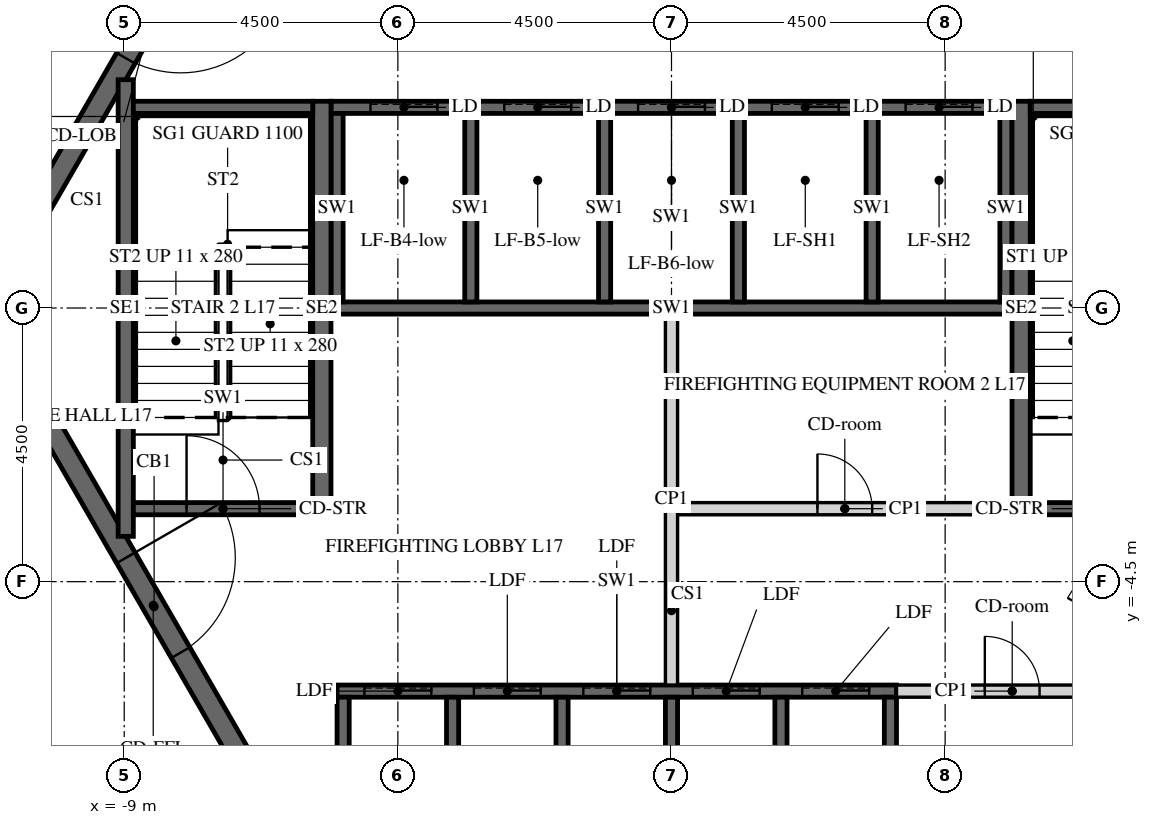
"""IFC4 building model, lengths in metres.
Left out: names, types, materials, properties, quantities, classifications, styles, units other than length and angle.
Written with IfcOpenShell. Run it as: python <this file> out.ifc"""

import sys

from ifc_helpers import new_model, si_unit, direction, frame, frame_2d, origin, place, context, subcontext, project, spatial, polyline, rectangle, outline, extrude, element, fill, save


model = new_model("IFC4")
c1 = context("Model", 3, precision=1e-05, world=origin(), true_north=direction((0.0, 1.0)))
c2 = subcontext(c1, "Body", "Model", "MODEL_VIEW")
j1 = project(units=[si_unit("LENGTHUNIT", "METRE"), si_unit("PLANEANGLEUNIT", "RADIAN")], contexts=[c1])
p1 = place(None, origin())
s1 = spatial("IfcSite", under=j1, at=p1, CompositionType="ELEMENT")
p2 = place(p1, origin())
s2 = spatial("IfcBuilding", under=s1, at=p2, CompositionType="ELEMENT")
p3 = place(p2, frame((0.0, 0.0, 80.4)))
s3 = spatial("IfcBuildingStorey", under=s2, at=p3, CompositionType="ELEMENT", Elevation=80.4)
p4 = place(p3, frame((-7.91, 13.7, -0.15), z_axis=(0.0, 0.0, 1.0), x_axis=(-0.499999880136, -0.866025472988, 0.0)))
e1 = element("IfcWall", 1, at=p4, inside=s3, PredefinedType="SHEAR", context=c2, shape_type="SweptSolid", body=[
    extrude(outline(polyline([(-0.173, -0.3), (15.993, -0.3), (15.646, 0.3), (0.173, 0.3), (-0.173, -0.3)])), origin(), (0.0, 0.0, 1.0), 3.9),
])
p5 = place(p4, frame((7.039, 0.0, 0.15)))
e2 = element("IfcOpeningElement", 2, at=p5, cuts=e1, PredefinedType="OPENING", context=c2, shape_type="SweptSolid", body=[
    extrude(rectangle(XDim=1.8, YDim=2.4, at=frame_2d((0.9, 1.2))), frame((0.0, 0.31, 0.0), z_axis=(0.0, -1.0, 0.0), x_axis=(1.0, 0.0, 0.0)), (0.0, 0.0, 1.0), 0.62),
])
p6 = place(p3, frame((-15.819, 0.0, -0.15), z_axis=(0.0, 0.0, 1.0), x_axis=(0.499999880136, -0.866025472988, 0.0)))
e3 = element("IfcWall", 3, at=p6, inside=s3, PredefinedType="SHEAR", context=c2, shape_type="SweptSolid", body=[
    extrude(outline(polyline([(-0.173, -0.3), (15.993, -0.3), (15.646, 0.3), (0.173, 0.3), (-0.173, -0.3)])), origin(), (0.0, 0.0, 1.0), 3.9),
])
p7 = place(p6, frame((6.981, 0.0, 0.15)))
e4 = element("IfcOpeningElement", 4, at=p7, cuts=e3, PredefinedType="OPENING", context=c2, shape_type="SweptSolid", body=[
    extrude(rectangle(XDim=1.8, YDim=2.4, at=frame_2d((0.9, 1.2))), frame((0.0, 0.31, 0.0), z_axis=(0.0, -1.0, 0.0), x_axis=(1.0, 0.0, 0.0)), (0.0, 0.0, 1.0), 0.62),
])
p8 = place(p3, frame((-5.673, 9.825, -0.15), z_axis=(0.0, 0.0, 1.0), x_axis=(-0.499995046907, -0.866028263435, 0.0)))
e5 = element("IfcWall", 5, at=p8, inside=s3, PredefinedType="SHEAR", context=c2, shape_type="SweptSolid", body=[
    extrude(outline(polyline([(-0.101, -0.175), (11.446, -0.175), (11.244, 0.175), (0.101, 0.175), (-0.101, -0.175)])), origin(), (0.0, 0.0, 1.0), 3.9),
])
p9 = place(p8, frame((4.801, 0.0, 0.15)))
e6 = element("IfcOpeningElement", 6, at=p9, cuts=e5, PredefinedType="OPENING", context=c2, shape_type="SweptSolid", body=[
    extrude(rectangle(XDim=1.8, YDim=2.4, at=frame_2d((0.9, 1.2))), frame((0.0, 0.185, 0.0), z_axis=(0.0, -1.0, 0.0), x_axis=(1.0, 0.0, 0.0)), (0.0, 0.0, 1.0), 0.37),
])
p10 = place(p3, frame((-11.345, 0.0, -0.15), z_axis=(0.0, 0.0, 1.0), x_axis=(0.499995046907, -0.866028263435, 0.0)))
e7 = element("IfcWall", 7, at=p10, inside=s3, PredefinedType="SHEAR", context=c2, shape_type="SweptSolid", body=[
    extrude(outline(polyline([(-0.101, -0.175), (11.446, -0.175), (11.244, 0.175), (0.101, 0.175), (-0.101, -0.175)])), origin(), (0.0, 0.0, 1.0), 3.9),
])
p11 = place(p10, frame((4.744, 0.0, 0.15)))
e8 = element("IfcOpeningElement", 8, at=p11, cuts=e7, PredefinedType="OPENING", context=c2, shape_type="SweptSolid", body=[
    extrude(rectangle(XDim=1.8, YDim=2.4, at=frame_2d((0.9, 1.2))), frame((0.0, 0.185, 0.0), z_axis=(0.0, -1.0, 0.0), x_axis=(1.0, 0.0, 0.0)), (0.0, 0.0, 1.0), 0.37),
])
p12 = place(p3, frame((5.673, -9.825, -0.15), z_axis=(0.0, 0.0, 1.0), x_axis=(0.499995046907, 0.866028263435, 0.0)))
e9 = element("IfcWall", 9, at=p12, inside=s3, PredefinedType="SHEAR", context=c2, shape_type="SweptSolid", body=[
    extrude(outline(polyline([(-0.101, -0.175), (11.446, -0.175), (11.244, 0.175), (0.101, 0.175), (-0.101, -0.175)])), origin(), (0.0, 0.0, 1.0), 3.9),
])
p13 = place(p12, frame((4.801, 0.0, 0.15)))
e10 = element("IfcOpeningElement", 10, at=p13, cuts=e9, PredefinedType="OPENING", context=c2, shape_type="SweptSolid", body=[
    extrude(rectangle(XDim=1.8, YDim=2.4, at=frame_2d((0.9, 1.2))), frame((0.0, 0.185, 0.0), z_axis=(0.0, -1.0, 0.0), x_axis=(1.0, 0.0, 0.0)), (0.0, 0.0, 1.0), 0.37),
])
p14 = place(p3, frame((11.345, 0.0, -0.15), z_axis=(0.0, 0.0, 1.0), x_axis=(-0.499995046907, 0.866028263435, 0.0)))
e11 = element("IfcWall", 11, at=p14, inside=s3, PredefinedType="SHEAR", context=c2, shape_type="SweptSolid", body=[
    extrude(outline(polyline([(-0.101, -0.175), (11.446, -0.175), (11.244, 0.175), (0.101, 0.175), (-0.101, -0.175)])), origin(), (0.0, 0.0, 1.0), 3.9),
])
p15 = place(p14, frame((4.744, 0.0, 0.15)))
e12 = element("IfcOpeningElement", 12, at=p15, cuts=e11, PredefinedType="OPENING", context=c2, shape_type="SweptSolid", body=[
    extrude(rectangle(XDim=1.8, YDim=2.4, at=frame_2d((0.9, 1.2))), frame((0.0, 0.185, 0.0), z_axis=(0.0, -1.0, 0.0), x_axis=(1.0, 0.0, 0.0)), (0.0, 0.0, 1.0), 0.37),
])
p16 = place(p3, frame((-5.6, 3.3, -0.25), z_axis=(0.0, 0.0, 1.0), x_axis=(1.0, 0.0, 0.0)))
e13 = element("IfcWall", 13, at=p16, inside=s3, PredefinedType="SHEAR", context=c2, shape_type="SweptSolid", body=[
    extrude(rectangle(XDim=11.2, YDim=0.2, at=frame_2d((5.6, 0.0))), origin(), (0.0, 0.0, 1.0), 3.9),
])
p17 = place(p16, frame((0.65, 0.0, 0.25)))
e14 = element("IfcOpeningElement", 14, at=p17, cuts=e13, PredefinedType="OPENING", context=c2, shape_type="SweptSolid", body=[
    extrude(rectangle(XDim=1.1, YDim=2.1, at=frame_2d((0.55, 1.05))), frame((0.0, 0.11, 0.0), z_axis=(0.0, -1.0, 0.0), x_axis=(1.0, 0.0, 0.0)), (0.0, 0.0, 1.0), 0.22),
])
p18 = place(p16, frame((2.85, 0.0, 0.25)))
e15 = element("IfcOpeningElement", 15, at=p18, cuts=e13, PredefinedType="OPENING", context=c2, shape_type="SweptSolid", body=[
    extrude(rectangle(XDim=1.1, YDim=2.1, at=frame_2d((0.55, 1.05))), frame((0.0, 0.11, 0.0), z_axis=(0.0, -1.0, 0.0), x_axis=(1.0, 0.0, 0.0)), (0.0, 0.0, 1.0), 0.22),
])
p19 = place(p16, frame((5.05, 0.0, 0.25)))
e16 = element("IfcOpeningElement", 16, at=p19, cuts=e13, PredefinedType="OPENING", context=c2, shape_type="SweptSolid", body=[
    extrude(rectangle(XDim=1.1, YDim=2.1, at=frame_2d((0.55, 1.05))), frame((0.0, 0.11, 0.0), z_axis=(0.0, -1.0, 0.0), x_axis=(1.0, 0.0, 0.0)), (0.0, 0.0, 1.0), 0.22),
])
p20 = place(p16, frame((7.25, 0.0, 0.25)))
e17 = element("IfcOpeningElement", 17, at=p20, cuts=e13, PredefinedType="OPENING", context=c2, shape_type="SweptSolid", body=[
    extrude(rectangle(XDim=1.1, YDim=2.1, at=frame_2d((0.55, 1.05))), frame((0.0, 0.11, 0.0), z_axis=(0.0, -1.0, 0.0), x_axis=(1.0, 0.0, 0.0)), (0.0, 0.0, 1.0), 0.22),
])
p21 = place(p16, frame((9.45, 0.0, 0.25)))
e18 = element("IfcOpeningElement", 18, at=p21, cuts=e13, PredefinedType="OPENING", context=c2, shape_type="SweptSolid", body=[
    extrude(rectangle(XDim=1.1, YDim=2.1, at=frame_2d((0.55, 1.05))), frame((0.0, 0.11, 0.0), z_axis=(0.0, -1.0, 0.0), x_axis=(1.0, 0.0, 0.0)), (0.0, 0.0, 1.0), 0.22),
])
p22 = place(p3, frame((-5.6, 0.0, -0.25), z_axis=(0.0, 0.0, 1.0), x_axis=(1.0, 0.0, 0.0)))
e19 = element("IfcWall", 19, at=p22, inside=s3, PredefinedType="SHEAR", context=c2, shape_type="SweptSolid", body=[
    extrude(rectangle(XDim=11.2, YDim=0.2, at=frame_2d((5.6, 0.0))), origin(), (0.0, 0.0, 1.0), 3.9),
])
for number, where, z_axis, x_axis in (
    (20, (-5.5, 0.1, -0.25), (0.0, 0.0, 1.0), (0.0, 1.0, 0.0)),
    (21, (-3.3, 0.1, -0.25), (0.0, 0.0, 1.0), (0.0, 1.0, 0.0)),
    (22, (-1.1, 0.1, -0.25), (0.0, 0.0, 1.0), (0.0, 1.0, 0.0)),
    (23, (1.1, 0.1, -0.25), (0.0, 0.0, 1.0), (0.0, 1.0, 0.0)),
    (24, (3.3, 0.1, -0.25), (0.0, 0.0, 1.0), (0.0, 1.0, 0.0)),
    (25, (5.5, 0.1, -0.25), (0.0, 0.0, 1.0), (0.0, 1.0, 0.0)),
):
    element("IfcWall", number, at=place(p3, frame(where, z_axis=z_axis, x_axis=x_axis)), inside=s3, PredefinedType="SHEAR", context=c2, shape_type="SweptSolid", body=[
        extrude(rectangle(XDim=3.1, YDim=0.2, at=frame_2d((1.55, 0.0))), origin(), (0.0, 0.0, 1.0), 3.9),
    ])
p23 = place(p3, frame((-5.5, -6.3, -0.25), z_axis=(0.0, 0.0, 1.0), x_axis=(1.0, 0.0, 0.0)))
e26 = element("IfcWall", 26, at=p23, inside=s3, PredefinedType="SHEAR", context=c2, shape_type="SweptSolid", body=[
    extrude(rectangle(XDim=9.2, YDim=0.2, at=frame_2d((4.6, 0.0))), origin(), (0.0, 0.0, 1.0), 3.9),
])
p24 = place(p23, frame((0.45, 0.0, 0.25)))
e27 = element("IfcOpeningElement", 27, at=p24, cuts=e26, PredefinedType="OPENING", context=c2, shape_type="SweptSolid", body=[
    extrude(rectangle(XDim=1.1, YDim=2.1, at=frame_2d((0.55, 1.05))), frame((0.0, 0.11, 0.0), z_axis=(0.0, -1.0, 0.0), x_axis=(1.0, 0.0, 0.0)), (0.0, 0.0, 1.0), 0.22),
])
p25 = place(p23, frame((2.25, 0.0, 0.25)))
e28 = element("IfcOpeningElement", 28, at=p25, cuts=e26, PredefinedType="OPENING", context=c2, shape_type="SweptSolid", body=[
    extrude(rectangle(XDim=1.1, YDim=2.1, at=frame_2d((0.55, 1.05))), frame((0.0, 0.11, 0.0), z_axis=(0.0, -1.0, 0.0), x_axis=(1.0, 0.0, 0.0)), (0.0, 0.0, 1.0), 0.22),
])
p26 = place(p23, frame((4.05, 0.0, 0.25)))
e29 = element("IfcOpeningElement", 29, at=p26, cuts=e26, PredefinedType="OPENING", context=c2, shape_type="SweptSolid", body=[
    extrude(rectangle(XDim=1.1, YDim=2.1, at=frame_2d((0.55, 1.05))), frame((0.0, 0.11, 0.0), z_axis=(0.0, -1.0, 0.0), x_axis=(1.0, 0.0, 0.0)), (0.0, 0.0, 1.0), 0.22),
])
p27 = place(p23, frame((5.85, 0.0, 0.25)))
e30 = element("IfcOpeningElement", 30, at=p27, cuts=e26, PredefinedType="OPENING", context=c2, shape_type="SweptSolid", body=[
    extrude(rectangle(XDim=1.1, YDim=2.1, at=frame_2d((0.55, 1.05))), frame((0.0, 0.11, 0.0), z_axis=(0.0, -1.0, 0.0), x_axis=(1.0, 0.0, 0.0)), (0.0, 0.0, 1.0), 0.22),
])
p28 = place(p23, frame((7.65, 0.0, 0.25)))
e31 = element("IfcOpeningElement", 31, at=p28, cuts=e26, PredefinedType="OPENING", context=c2, shape_type="SweptSolid", body=[
    extrude(rectangle(XDim=1.1, YDim=2.1, at=frame_2d((0.55, 1.05))), frame((0.0, 0.11, 0.0), z_axis=(0.0, -1.0, 0.0), x_axis=(1.0, 0.0, 0.0)), (0.0, 0.0, 1.0), 0.22),
])
for number, where, z_axis, x_axis in (
    (32, (-5.4, -9.3, -0.25), (0.0, 0.0, 1.0), (0.0, 1.0, 0.0)),
    (33, (-3.6, -9.3, -0.25), (0.0, 0.0, 1.0), (0.0, 1.0, 0.0)),
    (34, (-1.8, -9.3, -0.25), (0.0, 0.0, 1.0), (0.0, 1.0, 0.0)),
    (35, (0.0, -9.3, -0.25), (0.0, 0.0, 1.0), (0.0, 1.0, 0.0)),
    (36, (1.8, -9.3, -0.25), (0.0, 0.0, 1.0), (0.0, 1.0, 0.0)),
    (37, (3.6, -9.3, -0.25), (0.0, 0.0, 1.0), (0.0, 1.0, 0.0)),
):
    element("IfcWall", number, at=place(p3, frame(where, z_axis=z_axis, x_axis=x_axis)), inside=s3, PredefinedType="SHEAR", context=c2, shape_type="SweptSolid", body=[
        extrude(rectangle(XDim=2.9, YDim=0.2, at=frame_2d((1.45, 0.0))), origin(), (0.0, 0.0, 1.0), 3.9),
    ])
p29 = place(p3, frame((0.1, -3.3, 0.0), z_axis=(0.0, 0.0, 1.0), x_axis=(1.0, 0.0, 0.0)))
e38 = element("IfcWall", 38, at=p29, inside=s3, PredefinedType="PARTITIONING", context=c2, shape_type="SweptSolid", body=[
    extrude(rectangle(XDim=5.5, YDim=0.2, at=frame_2d((2.75, 0.0))), origin(), (0.0, 0.0, 1.0), 3.65),
])
p30 = place(p29, frame((2.3, 0.0, 0.0)))
e39 = element("IfcOpeningElement", 39, at=p30, cuts=e38, PredefinedType="OPENING", context=c2, shape_type="SweptSolid", body=[
    extrude(rectangle(XDim=0.9, YDim=2.1, at=frame_2d((0.45, 1.05))), frame((0.0, 0.11, 0.0), z_axis=(0.0, -1.0, 0.0), x_axis=(1.0, 0.0, 0.0)), (0.0, 0.0, 1.0), 0.22),
])
p31 = place(p3, frame((0.0, -6.2, 0.0), z_axis=(0.0, 0.0, 1.0), x_axis=(0.0, 1.0, 0.0)))
e40 = element("IfcWall", 40, at=p31, inside=s3, PredefinedType="PARTITIONING", context=c2, shape_type="SweptSolid", body=[
    extrude(rectangle(XDim=6.1, YDim=0.2, at=frame_2d((3.05, 0.0))), origin(), (0.0, 0.0, 1.0), 3.65),
])
p32 = place(p3, frame((3.7, -6.3, 0.0), z_axis=(0.0, 0.0, 1.0), x_axis=(1.0, 0.0, 0.0)))
e41 = element("IfcWall", 41, at=p32, inside=s3, PredefinedType="PARTITIONING", context=c2, shape_type="SweptSolid", body=[
    extrude(rectangle(XDim=3.806, YDim=0.2, at=frame_2d((1.903, 0.0))), origin(), (0.0, 0.0, 1.0), 3.65),
])
p33 = place(p32, frame((1.453, 0.0, 0.0)))
e42 = element("IfcOpeningElement", 42, at=p33, cuts=e41, PredefinedType="OPENING", context=c2, shape_type="SweptSolid", body=[
    extrude(rectangle(XDim=0.9, YDim=2.1, at=frame_2d((0.45, 1.05))), frame((0.0, 0.11, 0.0), z_axis=(0.0, -1.0, 0.0), x_axis=(1.0, 0.0, 0.0)), (0.0, 0.0, 1.0), 0.22),
])
p34 = place(p3, frame((5.75, -3.4, -0.25), z_axis=(0.0, 0.0, 1.0), x_axis=(0.0, 1.0, 0.0)))
e43 = element("IfcWall", 43, at=p34, inside=s3, PredefinedType="SHEAR", context=c2, shape_type="SweptSolid", body=[
    extrude(rectangle(XDim=6.8, YDim=0.3, at=frame_2d((3.4, 0.0))), origin(), (0.0, 0.0, 1.0), 3.9),
])
p35 = place(p3, frame((5.9, 3.3, -0.25), z_axis=(0.0, 0.0, 1.0), x_axis=(1.0, 0.0, 0.0)))
e44 = element("IfcWall", 44, at=p35, inside=s3, PredefinedType="SHEAR", context=c2, shape_type="SweptSolid", body=[
    extrude(rectangle(XDim=2.95, YDim=0.2, at=frame_2d((1.475, 0.0))), origin(), (0.0, 0.0, 1.0), 3.9),
])
p36 = place(p3, frame((5.9, -3.3, -0.25), z_axis=(0.0, 0.0, 1.0), x_axis=(1.0, 0.0, 0.0)))
e45 = element("IfcWall", 45, at=p36, inside=s3, PredefinedType="SHEAR", context=c2, shape_type="SweptSolid", body=[
    extrude(rectangle(XDim=2.95, YDim=0.2, at=frame_2d((1.475, 0.0))), origin(), (0.0, 0.0, 1.0), 3.9),
])
p37 = place(p36, frame((0.875, 0.0, 0.25)))
e46 = element("IfcOpeningElement", 46, at=p37, cuts=e45, PredefinedType="OPENING", context=c2, shape_type="SweptSolid", body=[
    extrude(rectangle(XDim=1.2, YDim=2.4, at=frame_2d((0.6, 1.2))), frame((0.0, 0.11, 0.0), z_axis=(0.0, -1.0, 0.0), x_axis=(1.0, 0.0, 0.0)), (0.0, 0.0, 1.0), 0.22),
])
p38 = place(p3, frame((-5.75, -3.4, -0.25), z_axis=(0.0, 0.0, 1.0), x_axis=(0.0, 1.0, 0.0)))
e47 = element("IfcWall", 47, at=p38, inside=s3, PredefinedType="SHEAR", context=c2, shape_type="SweptSolid", body=[
    extrude(rectangle(XDim=6.8, YDim=0.3, at=frame_2d((3.4, 0.0))), origin(), (0.0, 0.0, 1.0), 3.9),
])
p39 = place(p3, frame((-8.975, -3.755, -0.25), z_axis=(0.0, 0.0, 1.0), x_axis=(0.0, 1.0, 0.0)))
e48 = element("IfcWall", 48, at=p39, inside=s3, PredefinedType="SHEAR", context=c2, shape_type="SweptSolid", body=[
    extrude(rectangle(XDim=7.51, YDim=0.25, at=frame_2d((3.755, 0.0))), origin(), (0.0, 0.0, 1.0), 3.9),
])
p40 = place(p3, frame((-8.85, 3.3, -0.25), z_axis=(0.0, 0.0, 1.0), x_axis=(1.0, 0.0, 0.0)))
e49 = element("IfcWall", 49, at=p40, inside=s3, PredefinedType="SHEAR", context=c2, shape_type="SweptSolid", body=[
    extrude(rectangle(XDim=2.95, YDim=0.2, at=frame_2d((1.475, 0.0))), origin(), (0.0, 0.0, 1.0), 3.9),
])
p41 = place(p3, frame((-8.85, -3.3, -0.25), z_axis=(0.0, 0.0, 1.0), x_axis=(1.0, 0.0, 0.0)))
e50 = element("IfcWall", 50, at=p41, inside=s3, PredefinedType="SHEAR", context=c2, shape_type="SweptSolid", body=[
    extrude(rectangle(XDim=2.95, YDim=0.2, at=frame_2d((1.475, 0.0))), origin(), (0.0, 0.0, 1.0), 3.9),
])
p42 = place(p41, frame((0.875, 0.0, 0.25)))
e51 = element("IfcOpeningElement", 51, at=p42, cuts=e50, PredefinedType="OPENING", context=c2, shape_type="SweptSolid", body=[
    extrude(rectangle(XDim=1.2, YDim=2.4, at=frame_2d((0.6, 1.2))), frame((0.0, 0.11, 0.0), z_axis=(0.0, -1.0, 0.0), x_axis=(1.0, 0.0, 0.0)), (0.0, 0.0, 1.0), 0.22),
])
p43 = place(p9, origin())
e52 = element("IfcDoor", 52, at=p43, inside=s3, OperationType="DOUBLE_DOOR_SINGLE_SWING", PredefinedType="DOOR", context=c2, shape_type="SweptSolid", body=[
    extrude(rectangle(XDim=1.8, YDim=2.4, at=frame_2d((0.9, 1.2))), frame((0.0, 0.025, 0.0), z_axis=(0.0, -1.0, 0.0), x_axis=(1.0, 0.0, 0.0)), (0.0, 0.0, 1.0), 0.05),
])
fill(e6, e52)
p44 = place(p11, origin())
e53 = element("IfcDoor", 53, at=p44, inside=s3, OperationType="DOUBLE_DOOR_SINGLE_SWING", PredefinedType="DOOR", context=c2, shape_type="SweptSolid", body=[
    extrude(rectangle(XDim=1.8, YDim=2.4, at=frame_2d((0.9, 1.2))), frame((0.0, 0.025, 0.0), z_axis=(0.0, -1.0, 0.0), x_axis=(1.0, 0.0, 0.0)), (0.0, 0.0, 1.0), 0.05),
])
fill(e8, e53)
p45 = place(p30, origin())
e54 = element("IfcDoor", 54, at=p45, inside=s3, OperationType="SINGLE_SWING_LEFT", PredefinedType="DOOR", context=c2, shape_type="SweptSolid", body=[
    extrude(rectangle(XDim=0.9, YDim=2.1, at=frame_2d((0.45, 1.05))), frame((0.0, 0.025, 0.0), z_axis=(0.0, -1.0, 0.0), x_axis=(1.0, 0.0, 0.0)), (0.0, 0.0, 1.0), 0.05),
])
fill(e39, e54)
p46 = place(p33, origin())
e55 = element("IfcDoor", 55, at=p46, inside=s3, OperationType="SINGLE_SWING_LEFT", PredefinedType="DOOR", context=c2, shape_type="SweptSolid", body=[
    extrude(rectangle(XDim=0.9, YDim=2.1, at=frame_2d((0.45, 1.05))), frame((0.0, 0.025, 0.0), z_axis=(0.0, -1.0, 0.0), x_axis=(1.0, 0.0, 0.0)), (0.0, 0.0, 1.0), 0.05),
])
fill(e42, e55)
p47 = place(p42, origin())
e56 = element("IfcDoor", 56, at=p47, inside=s3, OperationType="SINGLE_SWING_LEFT", PredefinedType="DOOR", context=c2, shape_type="SweptSolid", body=[
    extrude(rectangle(XDim=1.2, YDim=2.4, at=frame_2d((0.6, 1.2))), frame((0.0, 0.025, 0.0), z_axis=(0.0, -1.0, 0.0), x_axis=(1.0, 0.0, 0.0)), (0.0, 0.0, 1.0), 0.05),
])
fill(e51, e56)
p48 = place(p17, origin())
e57 = element("IfcDoor", 57, at=p48, inside=s3, OperationType="SLIDING_TO_LEFT", PredefinedType="DOOR", context=c2, shape_type="SweptSolid", body=[
    extrude(rectangle(XDim=1.1, YDim=2.1, at=frame_2d((0.55, 1.05))), frame((0.0, 0.025, 0.0), z_axis=(0.0, -1.0, 0.0), x_axis=(1.0, 0.0, 0.0)), (0.0, 0.0, 1.0), 0.05),
])
fill(e14, e57)
p49 = place(p18, origin())
e58 = element("IfcDoor", 58, at=p49, inside=s3, OperationType="SLIDING_TO_LEFT", PredefinedType="DOOR", context=c2, shape_type="SweptSolid", body=[
    extrude(rectangle(XDim=1.1, YDim=2.1, at=frame_2d((0.55, 1.05))), frame((0.0, 0.025, 0.0), z_axis=(0.0, -1.0, 0.0), x_axis=(1.0, 0.0, 0.0)), (0.0, 0.0, 1.0), 0.05),
])
fill(e15, e58)
p50 = place(p19, origin())
e59 = element("IfcDoor", 59, at=p50, inside=s3, OperationType="SLIDING_TO_LEFT", PredefinedType="DOOR", context=c2, shape_type="SweptSolid", body=[
    extrude(rectangle(XDim=1.1, YDim=2.1, at=frame_2d((0.55, 1.05))), frame((0.0, 0.025, 0.0), z_axis=(0.0, -1.0, 0.0), x_axis=(1.0, 0.0, 0.0)), (0.0, 0.0, 1.0), 0.05),
])
fill(e16, e59)
p51 = place(p20, origin())
e60 = element("IfcDoor", 60, at=p51, inside=s3, OperationType="SLIDING_TO_LEFT", PredefinedType="DOOR", context=c2, shape_type="SweptSolid", body=[
    extrude(rectangle(XDim=1.1, YDim=2.1, at=frame_2d((0.55, 1.05))), frame((0.0, 0.025, 0.0), z_axis=(0.0, -1.0, 0.0), x_axis=(1.0, 0.0, 0.0)), (0.0, 0.0, 1.0), 0.05),
])
fill(e17, e60)
p52 = place(p21, origin())
e61 = element("IfcDoor", 61, at=p52, inside=s3, OperationType="SLIDING_TO_LEFT", PredefinedType="DOOR", context=c2, shape_type="SweptSolid", body=[
    extrude(rectangle(XDim=1.1, YDim=2.1, at=frame_2d((0.55, 1.05))), frame((0.0, 0.025, 0.0), z_axis=(0.0, -1.0, 0.0), x_axis=(1.0, 0.0, 0.0)), (0.0, 0.0, 1.0), 0.05),
])
fill(e18, e61)
p53 = place(p24, origin())
e62 = element("IfcDoor", 62, at=p53, inside=s3, OperationType="SLIDING_TO_LEFT", PredefinedType="DOOR", context=c2, shape_type="SweptSolid", body=[
    extrude(rectangle(XDim=1.1, YDim=2.1, at=frame_2d((0.55, 1.05))), frame((0.0, 0.025, 0.0), z_axis=(0.0, -1.0, 0.0), x_axis=(1.0, 0.0, 0.0)), (0.0, 0.0, 1.0), 0.05),
])
fill(e27, e62)
p54 = place(p25, origin())
e63 = element("IfcDoor", 63, at=p54, inside=s3, OperationType="SLIDING_TO_LEFT", PredefinedType="DOOR", context=c2, shape_type="SweptSolid", body=[
    extrude(rectangle(XDim=1.1, YDim=2.1, at=frame_2d((0.55, 1.05))), frame((0.0, 0.025, 0.0), z_axis=(0.0, -1.0, 0.0), x_axis=(1.0, 0.0, 0.0)), (0.0, 0.0, 1.0), 0.05),
])
fill(e28, e63)
p55 = place(p26, origin())
e64 = element("IfcDoor", 64, at=p55, inside=s3, OperationType="SLIDING_TO_LEFT", PredefinedType="DOOR", context=c2, shape_type="SweptSolid", body=[
    extrude(rectangle(XDim=1.1, YDim=2.1, at=frame_2d((0.55, 1.05))), frame((0.0, 0.025, 0.0), z_axis=(0.0, -1.0, 0.0), x_axis=(1.0, 0.0, 0.0)), (0.0, 0.0, 1.0), 0.05),
])
fill(e29, e64)
p56 = place(p27, origin())
e65 = element("IfcDoor", 65, at=p56, inside=s3, OperationType="SLIDING_TO_LEFT", PredefinedType="DOOR", context=c2, shape_type="SweptSolid", body=[
    extrude(rectangle(XDim=1.1, YDim=2.1, at=frame_2d((0.55, 1.05))), frame((0.0, 0.025, 0.0), z_axis=(0.0, -1.0, 0.0), x_axis=(1.0, 0.0, 0.0)), (0.0, 0.0, 1.0), 0.05),
])
fill(e30, e65)
p57 = place(p28, origin())
e66 = element("IfcDoor", 66, at=p57, inside=s3, OperationType="SLIDING_TO_LEFT", PredefinedType="DOOR", context=c2, shape_type="SweptSolid", body=[
    extrude(rectangle(XDim=1.1, YDim=2.1, at=frame_2d((0.55, 1.05))), frame((0.0, 0.025, 0.0), z_axis=(0.0, -1.0, 0.0), x_axis=(1.0, 0.0, 0.0)), (0.0, 0.0, 1.0), 0.05),
])
fill(e31, e66)
save(model, sys.argv[1])
